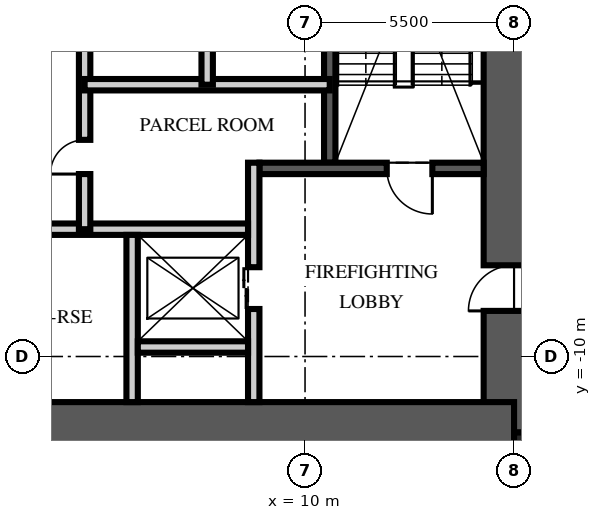
"""IFC4 building model, lengths in metres.
Left out: names, types, materials, properties, quantities, classifications, styles, units other than length and angle.
Written with IfcOpenShell. Run it as: python <this file> out.ifc"""

import sys

from ifc_helpers import new_model, si_unit, direction, frame, frame_2d, origin, origin_2d, place, context, subcontext, project, spatial, rectangle, extrude, element, fill, save


model = new_model("IFC4")
c1 = context("Model", 3, precision=1e-05, world=origin(), true_north=direction((0.0, 1.0)))
c2 = subcontext(c1, "Body", "Model", "MODEL_VIEW")
j1 = project(units=[si_unit("LENGTHUNIT", "METRE"), si_unit("PLANEANGLEUNIT", "RADIAN")], contexts=[c1])
p1 = place(None, origin())
s1 = spatial("IfcSite", under=j1, at=p1, CompositionType="ELEMENT")
p2 = place(p1, origin())
s2 = spatial("IfcBuilding", under=s1, at=p2, CompositionType="ELEMENT")
p3 = place(p2, frame((0.0, 0.0, 270.75)))
s3 = spatial("IfcBuildingStorey", under=s2, at=p3, CompositionType="ELEMENT", Elevation=270.75)
p4 = place(p3, frame((15.5, -12.0, -0.25), z_axis=(0.0, 0.0, 1.0), x_axis=(0.0, 1.0, 0.0)))
e1 = element("IfcWall", 1, at=p4, inside=s3, PredefinedType="SHEAR", context=c2, shape_type="SweptSolid", body=[
    extrude(rectangle(XDim=24.0, YDim=1.6, at=frame_2d((12.0, 0.0))), origin(), (0.0, 0.0, 1.0), 3.75),
])
p5 = place(p4, frame((3.2, 0.0, 0.25)))
e2 = element("IfcOpeningElement", 2, at=p5, cuts=e1, PredefinedType="OPENING", context=c2, shape_type="SweptSolid", body=[
    extrude(rectangle(XDim=1.2, YDim=2.1, at=frame_2d((0.6, 1.05))), frame((0.0, 0.81, 0.0), z_axis=(0.0, -1.0, 0.0), x_axis=(1.0, 0.0, 0.0)), (0.0, 0.0, 1.0), 1.62),
])
p6 = place(p4, frame((19.3, 0.0, 0.25)))
e3 = element("IfcOpeningElement", 3, at=p6, cuts=e1, PredefinedType="OPENING", context=c2, shape_type="SweptSolid", body=[
    extrude(rectangle(XDim=1.8, YDim=2.1, at=frame_2d((0.9, 1.05))), frame((0.0, 0.81, 0.0), z_axis=(0.0, -1.0, 0.0), x_axis=(1.0, 0.0, 0.0)), (0.0, 0.0, 1.0), 1.62),
])
p7 = place(p3, frame((-15.5, -12.0, -0.25), z_axis=(0.0, 0.0, 1.0), x_axis=(1.0, 0.0, 0.0)))
e4 = element("IfcWall", 4, at=p7, inside=s3, PredefinedType="SHEAR", context=c2, shape_type="SweptSolid", body=[
    extrude(rectangle(XDim=31.0, YDim=1.6, at=frame_2d((15.5, 0.0))), origin(), (0.0, 0.0, 1.0), 3.75),
])
p8 = place(p3, frame((15.9, -12.4, -0.25), z_axis=(0.0, 0.0, 1.0), x_axis=(1.0, 0.0, 0.0)))
e5 = element("IfcColumn", 5, at=p8, inside=s3, PredefinedType="COLUMN", context=c2, shape_type="SweptSolid", body=[
    extrude(rectangle(XDim=0.8, YDim=0.8, at=origin_2d()), origin(), (0.0, 0.0, 1.0), 3.75),
])
p9 = place(p3, frame((10.65, -4.9, 0.0), z_axis=(0.0, 0.0, 1.0), x_axis=(0.0, 1.0, 0.0)))
e6 = element("IfcWall", 6, at=p9, inside=s3, PredefinedType="SOLIDWALL", context=c2, shape_type="SweptSolid", body=[
    extrude(rectangle(XDim=10.1, YDim=0.3, at=frame_2d((5.05, 0.0))), origin(), (0.0, 0.0, 1.0), 3.5),
])
p10 = place(p3, frame((14.7, -5.05, 0.0), z_axis=(0.0, 0.0, 1.0), x_axis=(-1.0, 0.0, 0.0)))
e7 = element("IfcWall", 7, at=p10, inside=s3, PredefinedType="SOLIDWALL", context=c2, shape_type="SweptSolid", body=[
    extrude(rectangle(XDim=5.9, YDim=0.3, at=frame_2d((2.95, 0.0))), origin(), (0.0, 0.0, 1.0), 3.5),
])
p11 = place(p10, frame((1.35, 0.0, 0.0)))
e8 = element("IfcOpeningElement", 8, at=p11, cuts=e7, PredefinedType="OPENING", context=c2, shape_type="SweptSolid", body=[
    extrude(rectangle(XDim=1.2, YDim=2.1, at=frame_2d((0.6, 1.05))), frame((0.0, 0.16, 0.0), z_axis=(0.0, -1.0, 0.0), x_axis=(1.0, 0.0, 0.0)), (0.0, 0.0, 1.0), 0.32),
])
p12 = place(p3, frame((8.65, -11.2, 0.0), z_axis=(0.0, 0.0, 1.0), x_axis=(0.0, 1.0, 0.0)))
e9 = element("IfcWall", 9, at=p12, inside=s3, PredefinedType="PARTITIONING", context=c2, shape_type="SweptSolid", body=[
    extrude(rectangle(XDim=6.3, YDim=0.3, at=frame_2d((3.15, 0.0))), origin(), (0.0, 0.0, 1.0), 3.5),
])
p13 = place(p12, frame((2.45, 0.0, 0.0)))
e10 = element("IfcOpeningElement", 10, at=p13, cuts=e9, PredefinedType="OPENING", context=c2, shape_type="SweptSolid", body=[
    extrude(rectangle(XDim=1.1, YDim=2.1, at=frame_2d((0.55, 1.05))), frame((0.0, 0.16, 0.0), z_axis=(0.0, -1.0, 0.0), x_axis=(1.0, 0.0, 0.0)), (0.0, 0.0, 1.0), 0.32),
])
p14 = place(p3, frame((-8.5, -6.65, 0.0), z_axis=(0.0, 0.0, 1.0), x_axis=(1.0, 0.0, 0.0)))
e11 = element("IfcWall", 11, at=p14, inside=s3, PredefinedType="PARTITIONING", context=c2, shape_type="SweptSolid", body=[
    extrude(rectangle(XDim=17.0, YDim=0.3, at=frame_2d((8.5, 0.0))), origin(), (0.0, 0.0, 1.0), 3.5),
])
p15 = place(p14, frame((7.8, 0.0, 0.0)))
e12 = element("IfcOpeningElement", 12, at=p15, cuts=e11, PredefinedType="OPENING", context=c2, shape_type="SweptSolid", body=[
    extrude(rectangle(XDim=1.3, YDim=2.4, at=frame_2d((0.65, 1.2))), frame((0.0, 0.16, 0.0), z_axis=(0.0, -1.0, 0.0), x_axis=(1.0, 0.0, 0.0)), (0.0, 0.0, 1.0), 0.32),
])
p16 = place(p14, frame((5.65, 0.0, 0.0)))
e13 = element("IfcOpeningElement", 13, at=p16, cuts=e11, PredefinedType="OPENING", context=c2, shape_type="SweptSolid", body=[
    extrude(rectangle(XDim=0.9, YDim=2.1, at=frame_2d((0.45, 1.05))), frame((0.0, 0.16, 0.0), z_axis=(0.0, -1.0, 0.0), x_axis=(1.0, 0.0, 0.0)), (0.0, 0.0, 1.0), 0.32),
])
p17 = place(p14, frame((10.4, 0.0, 0.0)))
e14 = element("IfcOpeningElement", 14, at=p17, cuts=e11, PredefinedType="OPENING", context=c2, shape_type="SweptSolid", body=[
    extrude(rectangle(XDim=0.9, YDim=2.1, at=frame_2d((0.45, 1.05))), frame((0.0, 0.16, 0.0), z_axis=(0.0, -1.0, 0.0), x_axis=(1.0, 0.0, 0.0)), (0.0, 0.0, 1.0), 0.32),
])
p18 = place(p3, frame((5.45, -11.2, 0.0), z_axis=(0.0, 0.0, 1.0), x_axis=(0.0, 1.0, 0.0)))
e15 = element("IfcWall", 15, at=p18, inside=s3, PredefinedType="PARTITIONING", context=c2, shape_type="SweptSolid", body=[
    extrude(rectangle(XDim=4.4, YDim=0.3, at=frame_2d((2.2, 0.0))), origin(), (0.0, 0.0, 1.0), 3.5),
])
p19 = place(p3, frame((5.6, -9.75, 0.0), z_axis=(0.0, 0.0, 1.0), x_axis=(1.0, 0.0, 0.0)))
e16 = element("IfcWall", 16, at=p19, inside=s3, PredefinedType="PARTITIONING", context=c2, shape_type="SweptSolid", body=[
    extrude(rectangle(XDim=2.9, YDim=0.3, at=frame_2d((1.45, 0.0))), origin(), (0.0, 0.0, 1.0), 3.5),
])
p20 = place(p3, frame((4.2, -6.65, 0.0), z_axis=(0.0, 0.0, 1.0), x_axis=(0.0, 1.0, 0.0)))
e17 = element("IfcWall", 17, at=p20, inside=s3, PredefinedType="PARTITIONING", context=c2, shape_type="SweptSolid", body=[
    extrude(rectangle(XDim=8.45, YDim=0.3, at=frame_2d((4.225, 0.0))), origin(), (0.0, 0.0, 1.0), 3.5),
])
p21 = place(p20, frame((1.451, 0.0, 0.0)))
e18 = element("IfcOpeningElement", 18, at=p21, cuts=e17, PredefinedType="OPENING", context=c2, shape_type="SweptSolid", body=[
    extrude(rectangle(XDim=0.9, YDim=2.1, at=frame_2d((0.45, 1.05))), frame((0.0, 0.16, 0.0), z_axis=(0.0, -1.0, 0.0), x_axis=(1.0, 0.0, 0.0)), (0.0, 0.0, 1.0), 0.32),
])
p22 = place(p20, frame((5.676, 0.0, 0.0)))
e19 = element("IfcOpeningElement", 19, at=p22, cuts=e17, PredefinedType="OPENING", context=c2, shape_type="SweptSolid", body=[
    extrude(rectangle(XDim=0.9, YDim=2.1, at=frame_2d((0.45, 1.05))), frame((0.0, 0.16, 0.0), z_axis=(0.0, -1.0, 0.0), x_axis=(1.0, 0.0, 0.0)), (0.0, 0.0, 1.0), 0.32),
])
p23 = place(p3, frame((10.65, -2.848, 0.0), z_axis=(0.0, 0.0, 1.0), x_axis=(-1.0, 0.0, 0.0)))
e20 = element("IfcWall", 20, at=p23, inside=s3, PredefinedType="PARTITIONING", context=c2, shape_type="SweptSolid", body=[
    extrude(rectangle(XDim=6.45, YDim=0.3, at=frame_2d((3.225, 0.0))), origin(), (0.0, 0.0, 1.0), 3.5),
])
p24 = place(p3, frame((7.425, -2.848, 0.0), z_axis=(0.0, 0.0, 1.0), x_axis=(0.0, 1.0, 0.0)))
e21 = element("IfcWall", 21, at=p24, inside=s3, PredefinedType="PARTITIONING", context=c2, shape_type="SweptSolid", body=[
    extrude(rectangle(XDim=4.648, YDim=0.3, at=frame_2d((2.324, 0.0))), origin(), (0.0, 0.0, 1.0), 3.5),
])
p25 = place(p11, origin())
e22 = element("IfcDoor", 22, at=p25, inside=s3, OperationType="SINGLE_SWING_LEFT", PredefinedType="DOOR", context=c2, shape_type="SweptSolid", body=[
    extrude(rectangle(XDim=1.2, YDim=2.1, at=frame_2d((0.6, 1.05))), frame((0.0, 0.025, 0.0), z_axis=(0.0, -1.0, 0.0), x_axis=(1.0, 0.0, 0.0)), (0.0, 0.0, 1.0), 0.05),
])
fill(e8, e22)
p26 = place(p5, origin())
e23 = element("IfcDoor", 23, at=p26, inside=s3, OperationType="SINGLE_SWING_LEFT", PredefinedType="DOOR", context=c2, shape_type="SweptSolid", body=[
    extrude(rectangle(XDim=1.2, YDim=2.1, at=frame_2d((0.6, 1.05))), frame((0.0, 0.025, 0.0), z_axis=(0.0, -1.0, 0.0), x_axis=(1.0, 0.0, 0.0)), (0.0, 0.0, 1.0), 0.05),
])
fill(e2, e23)
p27 = place(p13, origin())
e24 = element("IfcDoor", 24, at=p27, inside=s3, OperationType="DOUBLE_DOOR_SLIDING", PredefinedType="DOOR", context=c2, shape_type="SweptSolid", body=[
    extrude(rectangle(XDim=1.1, YDim=2.1, at=frame_2d((0.55, 1.05))), frame((0.0, 0.025, 0.0), z_axis=(0.0, -1.0, 0.0), x_axis=(1.0, 0.0, 0.0)), (0.0, 0.0, 1.0), 0.05),
])
fill(e10, e24)
p28 = place(p21, origin())
e25 = element("IfcDoor", 25, at=p28, inside=s3, OperationType="SINGLE_SWING_LEFT", PredefinedType="DOOR", context=c2, shape_type="SweptSolid", body=[
    extrude(rectangle(XDim=0.9, YDim=2.1, at=frame_2d((0.45, 1.05))), frame((0.0, 0.025, 0.0), z_axis=(0.0, -1.0, 0.0), x_axis=(1.0, 0.0, 0.0)), (0.0, 0.0, 1.0), 0.05),
])
fill(e18, e25)
save(model, sys.argv[1])
